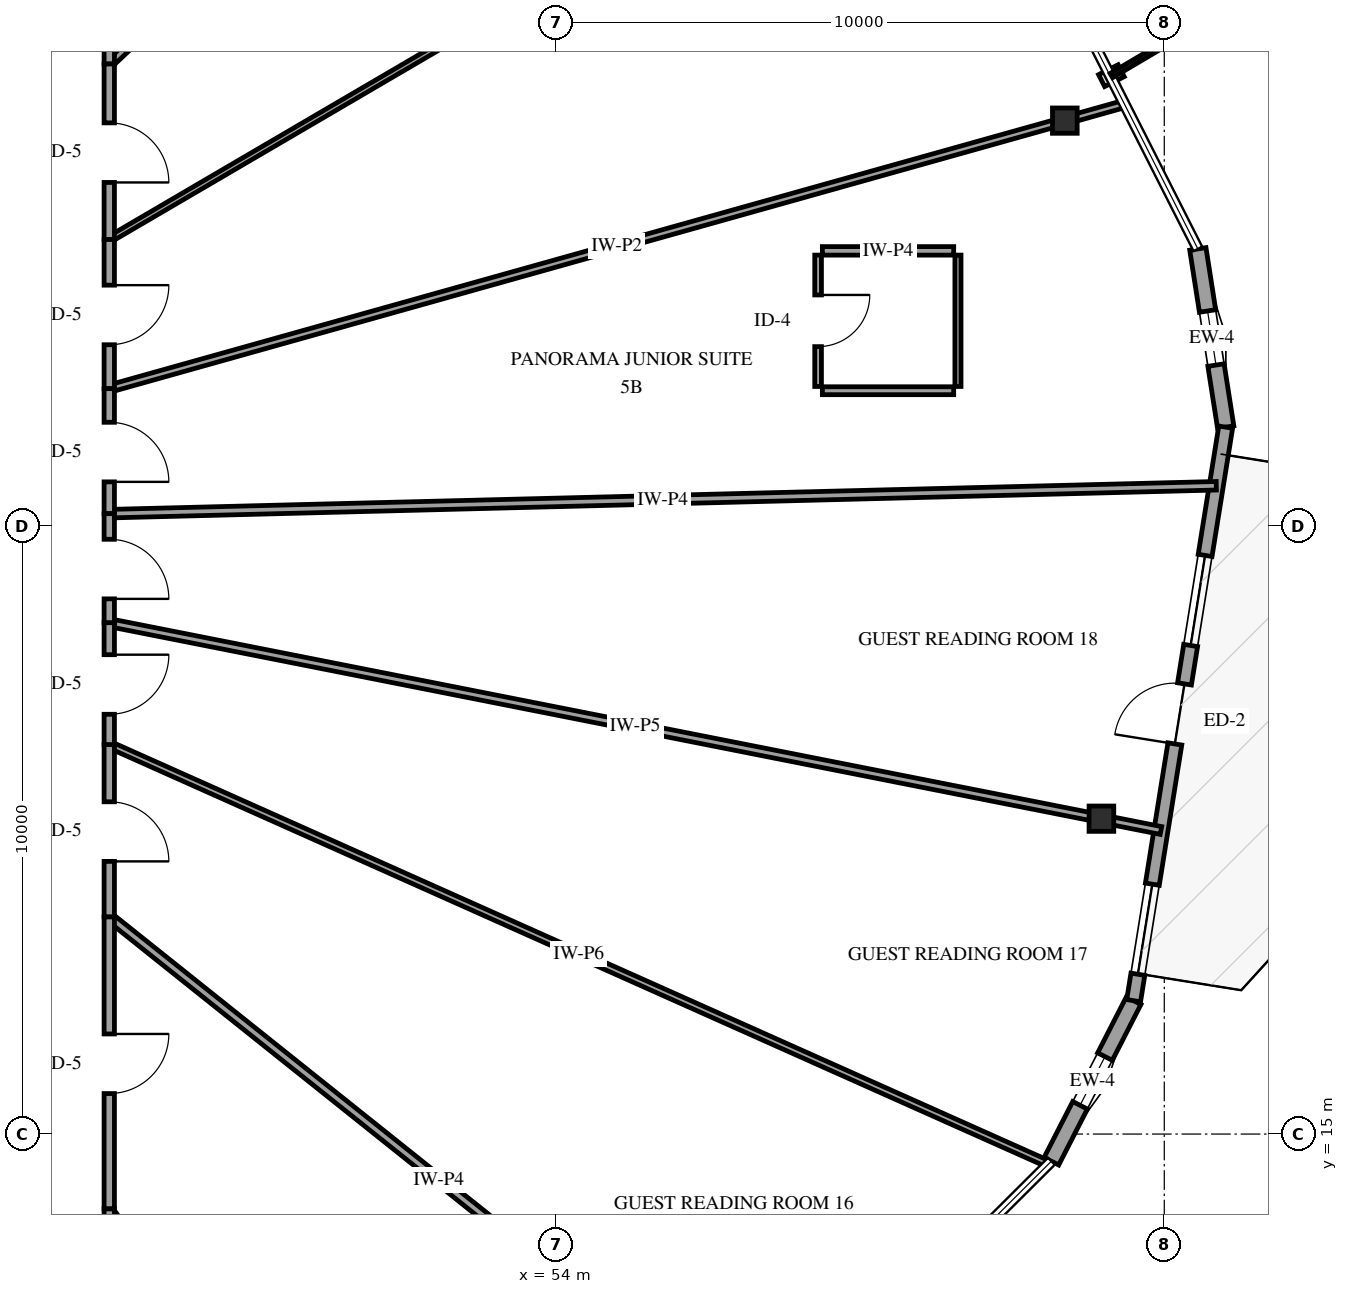
"""IFC4 building model, lengths in metres.
Left out: names, types, materials, properties, quantities, classifications, styles, units other than length and angle.
Written with IfcOpenShell. Run it as: python <this file> out.ifc"""

import sys

from ifc_helpers import new_model, si_unit, direction, frame, frame_2d, origin, origin_2d, place, context, subcontext, project, spatial, rectangle, i_section, extrude, element, fill, save


model = new_model("IFC4")
c1 = context("Model", 3, precision=1e-05, world=origin(), true_north=direction((0.0, 1.0)))
c2 = subcontext(c1, "Body", "Model", "MODEL_VIEW")
j1 = project(units=[si_unit("LENGTHUNIT", "METRE"), si_unit("PLANEANGLEUNIT", "RADIAN")], contexts=[c1])
p1 = place(None, origin())
s1 = spatial("IfcSite", under=j1, at=p1, CompositionType="ELEMENT")
p2 = place(p1, origin())
s2 = spatial("IfcBuilding", under=s1, at=p2, CompositionType="ELEMENT")
p3 = place(p2, frame((0.0, 0.0, 197.8)))
s3 = spatial("IfcBuildingStorey", under=s2, at=p3, CompositionType="ELEMENT", Elevation=197.8)
for number, where, z_axis, x_axis in (
    (1, (62.365, 31.666, 0.0), (0.0, 0.0, 1.0), (1.0, 0.0, 0.0)),
    (2, (62.966, 20.186, 0.0), (0.0, 0.0, 1.0), (1.0, 0.0, 0.0)),
):
    element("IfcColumn", number, at=place(p3, frame(where, z_axis=z_axis, x_axis=x_axis)), inside=s3, PredefinedType="COLUMN", context=c2, shape_type="SweptSolid", body=[
        extrude(i_section(OverallWidth=0.406, OverallDepth=0.416, WebThickness=0.03, FlangeThickness=0.048, FilletRadius=0.038, at=origin_2d()), origin(), (0.0, 0.0, 1.0), 3.6),
    ])
p4 = place(p3, frame((62.144, 14.553, 0.0), z_axis=(0.0, 0.0, 1.0), x_axis=(0.455850427724, 0.89005639571, 0.0)))
e3 = element("IfcWall", 3, at=p4, inside=s3, PredefinedType="SOLIDWALL", context=c2, shape_type="SweptSolid", body=[
    extrude(rectangle(XDim=2.967, YDim=0.27, at=frame_2d((1.483, 0.0))), origin(), (0.0, 0.0, 1.0), 2.679),
])
p5 = place(p4, frame((1.033, 0.0, 0.75)))
e4 = element("IfcOpeningElement", 4, at=p5, cuts=e3, PredefinedType="OPENING", context=c2, shape_type="SweptSolid", body=[
    extrude(rectangle(XDim=0.9, YDim=1.5, at=frame_2d((0.45, 0.75))), frame((0.0, 0.145, 0.0), z_axis=(0.0, -1.0, 0.0), x_axis=(1.0, 0.0, 0.0)), (0.0, 0.0, 1.0), 0.29),
])
p6 = place(p3, frame((65.01, 26.625, 0.0), z_axis=(0.0, 0.0, 1.0), x_axis=(-0.154301567716, 0.988023798398, 0.0)))
e5 = element("IfcWall", 5, at=p6, inside=s3, PredefinedType="SOLIDWALL", context=c2, shape_type="SweptSolid", body=[
    extrude(rectangle(XDim=2.967, YDim=0.27, at=frame_2d((1.483, 0.0))), origin(), (0.0, 0.0, 1.0), 2.679),
])
p7 = place(p6, frame((1.033, 0.0, 0.75)))
e6 = element("IfcOpeningElement", 6, at=p7, cuts=e5, PredefinedType="OPENING", context=c2, shape_type="SweptSolid", body=[
    extrude(rectangle(XDim=0.9, YDim=1.5, at=frame_2d((0.45, 0.75))), frame((0.0, 0.145, 0.0), z_axis=(0.0, -1.0, 0.0), x_axis=(1.0, 0.0, 0.0)), (0.0, 0.0, 1.0), 0.29),
])
p8 = place(p3, frame((63.496, 17.193, 0.0), z_axis=(0.0, 0.0, 1.0), x_axis=(0.158485894053, 0.987361241586, 0.0)))
e7 = element("IfcWall", 7, at=p8, inside=s3, PredefinedType="SOLIDWALL", context=c2, shape_type="SweptSolid", body=[
    extrude(rectangle(XDim=9.552, YDim=0.23, at=frame_2d((4.776, 0.0))), origin(), (0.0, 0.0, 1.0), 2.679),
])
p9 = place(p8, frame((4.276, 0.0, 0.0)))
e8 = element("IfcOpeningElement", 8, at=p9, cuts=e7, PredefinedType="OPENING", context=c2, shape_type="SweptSolid", body=[
    extrude(rectangle(XDim=1.0, YDim=2.15, at=frame_2d((0.5, 1.075))), frame((0.0, 0.125, 0.0), z_axis=(0.0, -1.0, 0.0), x_axis=(1.0, 0.0, 0.0)), (0.0, 0.0, 1.0), 0.25),
])
p10 = place(p8, frame((0.44, 0.0, 0.72)))
e9 = element("IfcOpeningElement", 9, at=p10, cuts=e7, PredefinedType="OPENING", context=c2, shape_type="SweptSolid", body=[
    extrude(rectangle(XDim=1.5, YDim=1.7, at=frame_2d((0.75, 0.85))), frame((0.0, 0.125, 0.0), z_axis=(0.0, -1.0, 0.0), x_axis=(1.0, 0.0, 0.0)), (0.0, 0.0, 1.0), 0.25),
])
p11 = place(p8, frame((5.916, 0.0, 0.72)))
e10 = element("IfcOpeningElement", 10, at=p11, cuts=e7, PredefinedType="OPENING", context=c2, shape_type="SweptSolid", body=[
    extrude(rectangle(XDim=1.5, YDim=1.7, at=frame_2d((0.75, 0.85))), frame((0.0, 0.125, 0.0), z_axis=(0.0, -1.0, 0.0), x_axis=(1.0, 0.0, 0.0)), (0.0, 0.0, 1.0), 0.25),
])
p12 = place(p3, frame((64.855, 25.661, 0.0), z_axis=(0.0, 0.0, 1.0), x_axis=(-0.999682331807, -0.025203878122, 0.0)))
e11 = element("IfcWall", 11, at=p12, inside=s3, PredefinedType="PARTITIONING", context=c2, shape_type="SweptSolid", body=[
    extrude(rectangle(XDim=18.211, YDim=0.14, at=frame_2d((9.105, 0.0))), origin(), (0.0, 0.0, 1.0), 3.3),
])
p13 = place(p3, frame((46.65, 23.41, 0.0), z_axis=(0.0, 0.0, 1.0), x_axis=(0.981026056524, -0.193875930483, 0.0)))
e12 = element("IfcWall", 12, at=p13, inside=s3, PredefinedType="PARTITIONING", context=c2, shape_type="SweptSolid", body=[
    extrude(rectangle(XDim=17.63, YDim=0.13, at=frame_2d((8.815, 0.0))), origin(), (0.0, 0.0, 1.0), 2.595),
])
p14 = place(p3, frame((46.65, 27.258, 0.0), z_axis=(0.0, 0.0, 1.0), x_axis=(0.962851035854, 0.270033114181, 0.0)))
e13 = element("IfcWall", 13, at=p14, inside=s3, PredefinedType="PARTITIONING", context=c2, shape_type="SweptSolid", body=[
    extrude(rectangle(XDim=17.338, YDim=0.12, at=frame_2d((8.669, 0.0))), origin(), (0.0, 0.0, 1.0), 3.3),
])
p15 = place(p3, frame((46.65, 21.405, 0.0), z_axis=(0.0, 0.0, 1.0), x_axis=(0.913073312597, -0.407795446055, 0.0)))
e14 = element("IfcWall", 14, at=p15, inside=s3, PredefinedType="PARTITIONING", context=c2, shape_type="SweptSolid", body=[
    extrude(rectangle(XDim=16.918, YDim=0.11, at=frame_2d((8.459, 0.0))), origin(), (0.0, 0.0, 1.0), 3.3),
])
p16 = place(p3, frame((46.65, 29.711, 0.0), z_axis=(0.0, 0.0, 1.0), x_axis=(0.863084226083, 0.505060014936, 0.0)))
e15 = element("IfcWall", 15, at=p16, inside=s3, PredefinedType="PARTITIONING", context=c2, shape_type="SweptSolid", body=[
    extrude(rectangle(XDim=15.927, YDim=0.1, at=frame_2d((7.963, 0.0))), origin(), (0.0, 0.0, 1.0), 3.3),
])
p17 = place(p3, frame((46.65, 18.573, 0.0), z_axis=(0.0, 0.0, 1.0), x_axis=(0.781502043787, -0.623902681158, 0.0)))
e16 = element("IfcWall", 16, at=p17, inside=s3, PredefinedType="PARTITIONING", context=c2, shape_type="SweptSolid", body=[
    extrude(rectangle(XDim=13.871, YDim=0.14, at=frame_2d((6.936, 0.0))), origin(), (0.0, 0.0, 1.0), 3.3),
])
p18 = place(p3, frame((46.65, 32.597, 0.0), z_axis=(0.0, 0.0, 1.0), x_axis=(0.727292042889, 0.68632811712, 0.0)))
e17 = element("IfcWall", 17, at=p18, inside=s3, PredefinedType="PARTITIONING", context=c2, shape_type="SweptSolid", body=[
    extrude(rectangle(XDim=12.719, YDim=0.13, at=frame_2d((6.359, 0.0))), origin(), (0.0, 0.0, 1.0), 2.595),
])
p19 = place(p3, frame((46.65, 13.769, 0.0), z_axis=(0.0, 0.0, 1.0), x_axis=(0.582566075225, -0.812783346284, 0.0)))
e18 = element("IfcWall", 18, at=p19, inside=s3, PredefinedType="PARTITIONING", context=c2, shape_type="SweptSolid", body=[
    extrude(rectangle(XDim=9.125, YDim=0.11, at=frame_2d((4.563, 0.0))), origin(), (0.0, 0.0, 1.0), 2.678),
])
p20 = place(p3, frame((46.65, 37.695, 0.0), z_axis=(0.0, 0.0, 1.0), x_axis=(0.0, -1.0, 0.0)))
e19 = element("IfcWall", 19, at=p20, inside=s3, PredefinedType="PARTITIONING", context=c2, shape_type="SweptSolid", body=[
    extrude(rectangle(XDim=5.098, YDim=0.17, at=frame_2d((2.549, 0.0))), origin(), (0.0, 0.0, 1.0), 3.3),
])
p21 = place(p20, frame((2.074, 0.0, 0.0)))
e20 = element("IfcOpeningElement", 20, at=p21, cuts=e19, PredefinedType="OPENING", context=c2, shape_type="SweptSolid", body=[
    extrude(rectangle(XDim=0.98, YDim=2.15, at=frame_2d((0.49, 1.075))), frame((0.0, 0.095, 0.0), z_axis=(0.0, -1.0, 0.0), x_axis=(1.0, 0.0, 0.0)), (0.0, 0.0, 1.0), 0.19),
])
p22 = place(p3, frame((46.65, 18.573, 0.0), z_axis=(0.0, 0.0, 1.0), x_axis=(0.0, -1.0, 0.0)))
e21 = element("IfcWall", 21, at=p22, inside=s3, PredefinedType="PARTITIONING", context=c2, shape_type="SweptSolid", body=[
    extrude(rectangle(XDim=4.804, YDim=0.17, at=frame_2d((2.402, 0.0))), origin(), (0.0, 0.0, 1.0), 3.3),
])
p23 = place(p22, frame((1.927, 0.0, 0.0)))
e22 = element("IfcOpeningElement", 22, at=p23, cuts=e21, PredefinedType="OPENING", context=c2, shape_type="SweptSolid", body=[
    extrude(rectangle(XDim=0.98, YDim=2.15, at=frame_2d((0.49, 1.075))), frame((0.0, 0.095, 0.0), z_axis=(0.0, -1.0, 0.0), x_axis=(1.0, 0.0, 0.0)), (0.0, 0.0, 1.0), 0.19),
])
p24 = place(p3, frame((46.65, 32.597, 0.0), z_axis=(0.0, 0.0, 1.0), x_axis=(0.0, -1.0, 0.0)))
e23 = element("IfcWall", 23, at=p24, inside=s3, PredefinedType="PARTITIONING", context=c2, shape_type="SweptSolid", body=[
    extrude(rectangle(XDim=2.886, YDim=0.17, at=frame_2d((1.443, 0.0))), origin(), (0.0, 0.0, 1.0), 3.3),
])
p25 = place(p24, frame((0.968, 0.0, 0.0)))
e24 = element("IfcOpeningElement", 24, at=p25, cuts=e23, PredefinedType="OPENING", context=c2, shape_type="SweptSolid", body=[
    extrude(rectangle(XDim=0.98, YDim=2.15, at=frame_2d((0.49, 1.075))), frame((0.0, 0.095, 0.0), z_axis=(0.0, -1.0, 0.0), x_axis=(1.0, 0.0, 0.0)), (0.0, 0.0, 1.0), 0.19),
])
p26 = place(p3, frame((46.65, 21.405, 0.0), z_axis=(0.0, 0.0, 1.0), x_axis=(0.0, -1.0, 0.0)))
e25 = element("IfcWall", 25, at=p26, inside=s3, PredefinedType="PARTITIONING", context=c2, shape_type="SweptSolid", body=[
    extrude(rectangle(XDim=2.832, YDim=0.17, at=frame_2d((1.416, 0.0))), origin(), (0.0, 0.0, 1.0), 3.3),
])
p27 = place(p26, frame((0.941, 0.0, 0.0)))
e26 = element("IfcOpeningElement", 26, at=p27, cuts=e25, PredefinedType="OPENING", context=c2, shape_type="SweptSolid", body=[
    extrude(rectangle(XDim=0.98, YDim=2.15, at=frame_2d((0.49, 1.075))), frame((0.0, 0.095, 0.0), z_axis=(0.0, -1.0, 0.0), x_axis=(1.0, 0.0, 0.0)), (0.0, 0.0, 1.0), 0.19),
])
p28 = place(p3, frame((46.65, 29.711, 0.0), z_axis=(0.0, 0.0, 1.0), x_axis=(0.0, -1.0, 0.0)))
e27 = element("IfcWall", 27, at=p28, inside=s3, PredefinedType="PARTITIONING", context=c2, shape_type="SweptSolid", body=[
    extrude(rectangle(XDim=2.453, YDim=0.17, at=frame_2d((1.227, 0.0))), origin(), (0.0, 0.0, 1.0), 3.3),
])
p29 = place(p28, frame((0.751, 0.0, 0.0)))
e28 = element("IfcOpeningElement", 28, at=p29, cuts=e27, PredefinedType="OPENING", context=c2, shape_type="SweptSolid", body=[
    extrude(rectangle(XDim=0.98, YDim=2.15, at=frame_2d((0.49, 1.075))), frame((0.0, 0.095, 0.0), z_axis=(0.0, -1.0, 0.0), x_axis=(1.0, 0.0, 0.0)), (0.0, 0.0, 1.0), 0.19),
])
p30 = place(p3, frame((58.307, 29.454, 0.0), z_axis=(0.0, 0.0, 1.0), x_axis=(0.0, -1.0, 0.0)))
e29 = element("IfcWall", 29, at=p30, inside=s3, PredefinedType="PARTITIONING", context=c2, shape_type="SweptSolid", body=[
    extrude(rectangle(XDim=2.16, YDim=0.11, at=frame_2d((1.08, 0.0))), origin(), (0.0, 0.0, 1.0), 3.3),
])
p31 = place(p30, frame((0.655, 0.0, 0.0)))
e30 = element("IfcOpeningElement", 30, at=p31, cuts=e29, PredefinedType="OPENING", context=c2, shape_type="SweptSolid", body=[
    extrude(rectangle(XDim=0.85, YDim=2.1, at=frame_2d((0.425, 1.05))), frame((0.0, 0.065, 0.0), z_axis=(0.0, -1.0, 0.0), x_axis=(1.0, 0.0, 0.0)), (0.0, 0.0, 1.0), 0.13),
])
p32 = place(p3, frame((60.607, 27.294, 0.0), z_axis=(0.0, 0.0, 1.0), x_axis=(0.0, 1.0, 0.0)))
e31 = element("IfcWall", 31, at=p32, inside=s3, PredefinedType="PARTITIONING", context=c2, shape_type="SweptSolid", body=[
    extrude(rectangle(XDim=2.16, YDim=0.1, at=frame_2d((1.08, 0.0))), origin(), (0.0, 0.0, 1.0), 3.3),
])
p33 = place(p3, frame((60.537, 29.524, 0.0), z_axis=(0.0, 0.0, 1.0), x_axis=(-1.0, 0.0, 0.0)))
e32 = element("IfcWall", 32, at=p33, inside=s3, PredefinedType="PARTITIONING", context=c2, shape_type="SweptSolid", body=[
    extrude(rectangle(XDim=2.16, YDim=0.14, at=frame_2d((1.08, 0.0))), origin(), (0.0, 0.0, 1.0), 3.3),
])
p34 = place(p3, frame((58.377, 27.224, 0.0), z_axis=(0.0, 0.0, 1.0), x_axis=(1.0, 0.0, 0.0)))
e33 = element("IfcWall", 33, at=p34, inside=s3, PredefinedType="PARTITIONING", context=c2, shape_type="SweptSolid", body=[
    extrude(rectangle(XDim=2.16, YDim=0.13, at=frame_2d((1.08, 0.0))), origin(), (0.0, 0.0, 1.0), 3.3),
])
p35 = place(p3, frame((46.65, 27.258, 0.0), z_axis=(0.0, 0.0, 1.0), x_axis=(0.0, -1.0, 0.0)))
e34 = element("IfcWall", 34, at=p35, inside=s3, PredefinedType="PARTITIONING", context=c2, shape_type="SweptSolid", body=[
    extrude(rectangle(XDim=2.056, YDim=0.17, at=frame_2d((1.028, 0.0))), origin(), (0.0, 0.0, 1.0), 3.3),
])
p36 = place(p35, frame((0.553, 0.0, 0.0)))
e35 = element("IfcOpeningElement", 35, at=p36, cuts=e34, PredefinedType="OPENING", context=c2, shape_type="SweptSolid", body=[
    extrude(rectangle(XDim=0.98, YDim=2.15, at=frame_2d((0.49, 1.075))), frame((0.0, 0.095, 0.0), z_axis=(0.0, -1.0, 0.0), x_axis=(1.0, 0.0, 0.0)), (0.0, 0.0, 1.0), 0.19),
])
p37 = place(p3, frame((46.65, 23.41, 0.0), z_axis=(0.0, 0.0, 1.0), x_axis=(0.0, -1.0, 0.0)))
e36 = element("IfcWall", 36, at=p37, inside=s3, PredefinedType="PARTITIONING", context=c2, shape_type="SweptSolid", body=[
    extrude(rectangle(XDim=2.005, YDim=0.17, at=frame_2d((1.002, 0.0))), origin(), (0.0, 0.0, 1.0), 3.3),
])
p38 = place(p37, frame((0.527, 0.0, 0.0)))
e37 = element("IfcOpeningElement", 37, at=p38, cuts=e36, PredefinedType="OPENING", context=c2, shape_type="SweptSolid", body=[
    extrude(rectangle(XDim=0.98, YDim=2.15, at=frame_2d((0.49, 1.075))), frame((0.0, 0.095, 0.0), z_axis=(0.0, -1.0, 0.0), x_axis=(1.0, 0.0, 0.0)), (0.0, 0.0, 1.0), 0.19),
])
p39 = place(p3, frame((46.65, 25.202, 0.0), z_axis=(0.0, 0.0, 1.0), x_axis=(0.0, -1.0, 0.0)))
e38 = element("IfcWall", 38, at=p39, inside=s3, PredefinedType="PARTITIONING", context=c2, shape_type="SweptSolid", body=[
    extrude(rectangle(XDim=1.792, YDim=0.17, at=frame_2d((0.896, 0.0))), origin(), (0.0, 0.0, 1.0), 3.3),
])
p40 = place(p39, frame((0.421, 0.0, 0.0)))
e39 = element("IfcOpeningElement", 39, at=p40, cuts=e38, PredefinedType="OPENING", context=c2, shape_type="SweptSolid", body=[
    extrude(rectangle(XDim=0.98, YDim=2.15, at=frame_2d((0.49, 1.075))), frame((0.0, 0.095, 0.0), z_axis=(0.0, -1.0, 0.0), x_axis=(1.0, 0.0, 0.0)), (0.0, 0.0, 1.0), 0.19),
])
p41 = place(p3, frame((46.65, 13.769, 0.0), z_axis=(0.0, 0.0, 1.0), x_axis=(0.0, -1.0, 0.0)))
e40 = element("IfcWall", 40, at=p41, inside=s3, PredefinedType="PARTITIONING", context=c2, shape_type="SweptSolid", body=[
    extrude(rectangle(XDim=0.749, YDim=0.17, at=frame_2d((0.375, 0.0))), origin(), (0.0, 0.0, 1.0), 3.3),
])
p42 = place(p5, origin())
e41 = element("IfcWindow", 41, at=p42, inside=s3, PartitioningType="SINGLE_PANEL", PredefinedType="WINDOW", context=c2, shape_type="SweptSolid", body=[
    extrude(rectangle(XDim=0.9, YDim=1.5, at=frame_2d((0.45, 0.75))), frame((0.0, 0.03, 0.0), z_axis=(0.0, -1.0, 0.0), x_axis=(1.0, 0.0, 0.0)), (0.0, 0.0, 1.0), 0.06),
])
fill(e4, e41)
p43 = place(p7, origin())
e42 = element("IfcWindow", 42, at=p43, inside=s3, PartitioningType="SINGLE_PANEL", PredefinedType="WINDOW", context=c2, shape_type="SweptSolid", body=[
    extrude(rectangle(XDim=0.9, YDim=1.5, at=frame_2d((0.45, 0.75))), frame((0.0, 0.03, 0.0), z_axis=(0.0, -1.0, 0.0), x_axis=(1.0, 0.0, 0.0)), (0.0, 0.0, 1.0), 0.06),
])
fill(e6, e42)
p44 = place(p9, origin())
e43 = element("IfcDoor", 43, at=p44, inside=s3, OperationType="SINGLE_SWING_LEFT", PredefinedType="DOOR", context=c2, shape_type="SweptSolid", body=[
    extrude(rectangle(XDim=1.0, YDim=2.15, at=frame_2d((0.5, 1.075))), frame((0.0, 0.025, 0.0), z_axis=(0.0, -1.0, 0.0), x_axis=(1.0, 0.0, 0.0)), (0.0, 0.0, 1.0), 0.05),
])
fill(e8, e43)
p45 = place(p10, origin())
e44 = element("IfcWindow", 44, at=p45, inside=s3, PartitioningType="SINGLE_PANEL", PredefinedType="WINDOW", context=c2, shape_type="SweptSolid", body=[
    extrude(rectangle(XDim=1.5, YDim=1.7, at=frame_2d((0.75, 0.85))), frame((0.0, 0.03, 0.0), z_axis=(0.0, -1.0, 0.0), x_axis=(1.0, 0.0, 0.0)), (0.0, 0.0, 1.0), 0.06),
])
fill(e9, e44)
p46 = place(p11, origin())
e45 = element("IfcWindow", 45, at=p46, inside=s3, PartitioningType="SINGLE_PANEL", PredefinedType="WINDOW", context=c2, shape_type="SweptSolid", body=[
    extrude(rectangle(XDim=1.5, YDim=1.7, at=frame_2d((0.75, 0.85))), frame((0.0, 0.03, 0.0), z_axis=(0.0, -1.0, 0.0), x_axis=(1.0, 0.0, 0.0)), (0.0, 0.0, 1.0), 0.06),
])
fill(e10, e45)
p47 = place(p23, origin())
e46 = element("IfcDoor", 46, at=p47, inside=s3, OperationType="SINGLE_SWING_LEFT", PredefinedType="DOOR", context=c2, shape_type="SweptSolid", body=[
    extrude(rectangle(XDim=0.98, YDim=2.15, at=frame_2d((0.49, 1.075))), frame((0.0, 0.025, 0.0), z_axis=(0.0, -1.0, 0.0), x_axis=(1.0, 0.0, 0.0)), (0.0, 0.0, 1.0), 0.05),
])
fill(e22, e46)
p48 = place(p25, origin())
e47 = element("IfcDoor", 47, at=p48, inside=s3, OperationType="SINGLE_SWING_RIGHT", PredefinedType="DOOR", context=c2, shape_type="SweptSolid", body=[
    extrude(rectangle(XDim=0.98, YDim=2.15, at=frame_2d((0.49, 1.075))), frame((0.0, 0.025, 0.0), z_axis=(0.0, -1.0, 0.0), x_axis=(1.0, 0.0, 0.0)), (0.0, 0.0, 1.0), 0.05),
])
fill(e24, e47)
p49 = place(p27, origin())
e48 = element("IfcDoor", 48, at=p49, inside=s3, OperationType="SINGLE_SWING_RIGHT", PredefinedType="DOOR", context=c2, shape_type="SweptSolid", body=[
    extrude(rectangle(XDim=0.98, YDim=2.15, at=frame_2d((0.49, 1.075))), frame((0.0, 0.025, 0.0), z_axis=(0.0, -1.0, 0.0), x_axis=(1.0, 0.0, 0.0)), (0.0, 0.0, 1.0), 0.05),
])
fill(e26, e48)
p50 = place(p29, origin())
e49 = element("IfcDoor", 49, at=p50, inside=s3, OperationType="SINGLE_SWING_LEFT", PredefinedType="DOOR", context=c2, shape_type="SweptSolid", body=[
    extrude(rectangle(XDim=0.98, YDim=2.15, at=frame_2d((0.49, 1.075))), frame((0.0, 0.025, 0.0), z_axis=(0.0, -1.0, 0.0), x_axis=(1.0, 0.0, 0.0)), (0.0, 0.0, 1.0), 0.05),
])
fill(e28, e49)
p51 = place(p31, origin())
e50 = element("IfcDoor", 50, at=p51, inside=s3, OperationType="SINGLE_SWING_LEFT", PredefinedType="DOOR", context=c2, shape_type="SweptSolid", body=[
    extrude(rectangle(XDim=0.85, YDim=2.1, at=frame_2d((0.425, 1.05))), frame((0.0, 0.025, 0.0), z_axis=(0.0, -1.0, 0.0), x_axis=(1.0, 0.0, 0.0)), (0.0, 0.0, 1.0), 0.05),
])
fill(e30, e50)
p52 = place(p36, origin())
e51 = element("IfcDoor", 51, at=p52, inside=s3, OperationType="SINGLE_SWING_RIGHT", PredefinedType="DOOR", context=c2, shape_type="SweptSolid", body=[
    extrude(rectangle(XDim=0.98, YDim=2.15, at=frame_2d((0.49, 1.075))), frame((0.0, 0.025, 0.0), z_axis=(0.0, -1.0, 0.0), x_axis=(1.0, 0.0, 0.0)), (0.0, 0.0, 1.0), 0.05),
])
fill(e35, e51)
p53 = place(p38, origin())
e52 = element("IfcDoor", 52, at=p53, inside=s3, OperationType="SINGLE_SWING_LEFT", PredefinedType="DOOR", context=c2, shape_type="SweptSolid", body=[
    extrude(rectangle(XDim=0.98, YDim=2.15, at=frame_2d((0.49, 1.075))), frame((0.0, 0.025, 0.0), z_axis=(0.0, -1.0, 0.0), x_axis=(1.0, 0.0, 0.0)), (0.0, 0.0, 1.0), 0.05),
])
fill(e37, e52)
p54 = place(p40, origin())
e53 = element("IfcDoor", 53, at=p54, inside=s3, OperationType="SINGLE_SWING_RIGHT", PredefinedType="DOOR", context=c2, shape_type="SweptSolid", body=[
    extrude(rectangle(XDim=0.98, YDim=2.15, at=frame_2d((0.49, 1.075))), frame((0.0, 0.025, 0.0), z_axis=(0.0, -1.0, 0.0), x_axis=(1.0, 0.0, 0.0)), (0.0, 0.0, 1.0), 0.05),
])
fill(e39, e53)
save(model, sys.argv[1])
